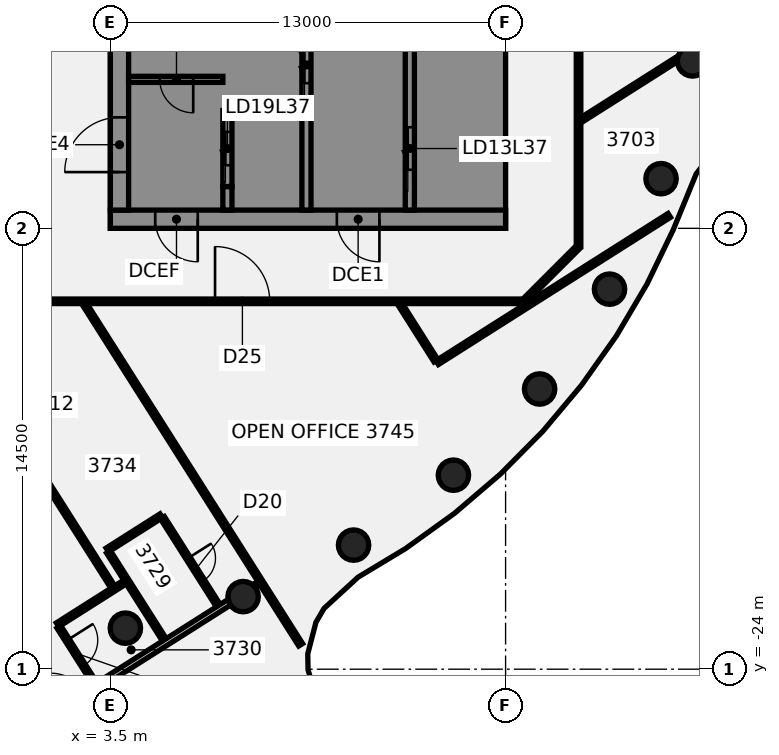
"""IFC4 building model, lengths in metres.
Left out: names, types, materials, properties, quantities, classifications, styles, units other than length and angle.
Written with IfcOpenShell. Run it as: python <this file> out.ifc"""

import sys

from ifc_helpers import new_model, si_unit, direction, frame, frame_2d, origin, origin_2d, place, context, subcontext, project, spatial, polyline, rectangle, circle, outline, extrude, element, fill, save


model = new_model("IFC4")
c1 = context("Model", 3, precision=1e-05, world=origin(), true_north=direction((0.0, 1.0)))
c2 = subcontext(c1, "Body", "Model", "MODEL_VIEW")
j1 = project(units=[si_unit("LENGTHUNIT", "METRE"), si_unit("PLANEANGLEUNIT", "RADIAN")], contexts=[c1])
p1 = place(None, origin())
s1 = spatial("IfcSite", under=j1, at=p1, CompositionType="ELEMENT")
p2 = place(p1, origin())
s2 = spatial("IfcBuilding", under=s1, at=p2, CompositionType="ELEMENT")
p3 = place(p2, frame((0.0, 0.0, 151.75)))
s3 = spatial("IfcBuildingStorey", under=s2, at=p3, CompositionType="ELEMENT", Elevation=151.75)
for number, where, z_axis, x_axis in (
    (1, (3.994, -22.651, -0.14), (0.0, 0.0, 1.0), (1.0, 0.0, 0.0)),
    (2, (7.866, -21.613, -0.14), (0.0, 0.0, 1.0), (1.0, 0.0, 0.0)),
    (3, (11.5, -19.919, -0.14), (0.0, 0.0, 1.0), (1.0, 0.0, 0.0)),
    (4, (14.784, -17.619, -0.14), (0.0, 0.0, 1.0), (1.0, 0.0, 0.0)),
    (5, (17.619, -14.784, -0.14), (0.0, 0.0, 1.0), (1.0, 0.0, 0.0)),
    (6, (19.919, -11.5, -0.14), (0.0, 0.0, 1.0), (1.0, 0.0, 0.0)),
    (7, (21.613, -7.866, -0.14), (0.0, 0.0, 1.0), (1.0, 0.0, 0.0)),
    (8, (22.651, -3.994, -0.14), (0.0, 0.0, 1.0), (1.0, 0.0, 0.0)),
):
    element("IfcColumn", number, at=place(p3, frame(where, z_axis=z_axis, x_axis=x_axis)), inside=s3, PredefinedType="COLUMN", context=c2, shape_type="SweptSolid", body=[
        extrude(circle(Radius=0.5, at=origin_2d()), origin(), (0.0, 0.0, 1.0), 3.75),
    ])
p4 = place(p3, frame((-2.319, -11.997, 0.0), z_axis=(0.0, 0.0, 1.0), x_axis=(0.535683974437, -0.844418545232, 0.0)))
e9 = element("IfcWall", 9, at=p4, inside=s3, PredefinedType="PARTITIONING", context=c2, shape_type="SweptSolid", body=[
    extrude(rectangle(XDim=11.009, YDim=0.15, at=frame_2d((5.505, 0.0))), origin(), (0.0, 0.0, 1.0), 3.01),
])
p5 = place(p4, frame((3.485, 0.0, 0.0)))
e10 = element("IfcOpeningElement", 10, at=p5, cuts=e9, PredefinedType="OPENING", context=c2, shape_type="SweptSolid", body=[
    extrude(rectangle(XDim=0.9, YDim=2.1, at=frame_2d((0.45, 1.05))), frame((0.0, 0.085, 0.0), z_axis=(0.0, -1.0, 0.0), x_axis=(1.0, 0.0, 0.0)), (0.0, 0.0, 1.0), 0.17),
])
p6 = place(p3, frame((1.806, -22.607, 0.0), z_axis=(0.0, 0.0, 1.0), x_axis=(0.535719099476, -0.844396261513, 0.0)))
e11 = element("IfcWall", 11, at=p6, inside=s3, PredefinedType="PARTITIONING", context=c2, shape_type="SweptSolid", body=[
    extrude(rectangle(XDim=20.24, YDim=0.15, at=frame_2d((10.12, 0.0))), origin(), (0.0, 0.0, 1.0), 3.01),
])
p7 = place(p6, frame((0.52, 0.0, 0.0)))
e12 = element("IfcOpeningElement", 12, at=p7, cuts=e11, PredefinedType="OPENING", context=c2, shape_type="SweptSolid", body=[
    extrude(rectangle(XDim=1.0, YDim=2.1, at=frame_2d((0.5, 1.05))), frame((0.0, 0.085, 0.0), z_axis=(0.0, -1.0, 0.0), x_axis=(1.0, 0.0, 0.0)), (0.0, 0.0, 1.0), 0.17),
])
p8 = place(p6, frame((10.571, 0.0, 0.0)))
e13 = element("IfcOpeningElement", 13, at=p8, cuts=e11, PredefinedType="OPENING", context=c2, shape_type="SweptSolid", body=[
    extrude(rectangle(XDim=0.9, YDim=2.1, at=frame_2d((0.45, 1.05))), frame((0.0, 0.085, 0.0), z_axis=(0.0, -1.0, 0.0), x_axis=(1.0, 0.0, 0.0)), (0.0, 0.0, 1.0), 0.17),
])
p9 = place(p6, frame((17.021, 0.0, 0.0)))
e14 = element("IfcOpeningElement", 14, at=p9, cuts=e11, PredefinedType="OPENING", context=c2, shape_type="SweptSolid", body=[
    extrude(rectangle(XDim=0.9, YDim=2.1, at=frame_2d((0.45, 1.05))), frame((0.0, 0.085, 0.0), z_axis=(0.0, -1.0, 0.0), x_axis=(1.0, 0.0, 0.0)), (0.0, 0.0, 1.0), 0.17),
])
p10 = place(p3, frame((2.655, -11.997, 0.0), z_axis=(0.0, 0.0, 1.0), x_axis=(0.53566721482, -0.844429176999, 0.0)))
e15 = element("IfcWall", 15, at=p10, inside=s3, PredefinedType="PARTITIONING", context=c2, shape_type="SweptSolid", body=[
    extrude(rectangle(XDim=13.263, YDim=0.15, at=frame_2d((6.632, 0.0))), origin(), (0.0, 0.0, 1.0), 3.01),
])
p11 = place(p3, frame((3.44, -20.143, 0.0), z_axis=(0.0, 0.0, 1.0), x_axis=(0.535892834872, -0.844286011689, 0.0)))
e16 = element("IfcWall", 16, at=p11, inside=s3, PredefinedType="PARTITIONING", context=c2, shape_type="SweptSolid", body=[
    extrude(rectangle(XDim=3.426, YDim=0.15, at=frame_2d((1.713, 0.0))), origin(), (0.0, 0.0, 1.0), 3.01),
])
p12 = place(p3, frame((5.214, -19.018, 0.0), z_axis=(0.0, 0.0, 1.0), x_axis=(0.535555665094, -0.844499928707, 0.0)))
e17 = element("IfcWall", 17, at=p12, inside=s3, PredefinedType="PARTITIONING", context=c2, shape_type="SweptSolid", body=[
    extrude(rectangle(XDim=3.425, YDim=0.15, at=frame_2d((1.712, 0.0))), origin(), (0.0, 0.0, 1.0), 3.01),
])
p13 = place(p12, frame((1.575, 0.0, 0.0)))
e18 = element("IfcOpeningElement", 18, at=p13, cuts=e17, PredefinedType="OPENING", context=c2, shape_type="SweptSolid", body=[
    extrude(rectangle(XDim=0.9, YDim=2.1, at=frame_2d((0.45, 1.05))), frame((0.0, 0.085, 0.0), z_axis=(0.0, -1.0, 0.0), x_axis=(1.0, 0.0, 0.0)), (0.0, 0.0, 1.0), 0.17),
])
p14 = place(p3, frame((13.031, -11.997, 0.0), z_axis=(0.0, 0.0, 1.0), x_axis=(0.535487935778, -0.84454287673, 0.0)))
e19 = element("IfcWall", 19, at=p14, inside=s3, PredefinedType="PARTITIONING", context=c2, shape_type="SweptSolid", body=[
    extrude(rectangle(XDim=2.198, YDim=0.15, at=frame_2d((1.099, 0.0))), origin(), (0.0, 0.0, 1.0), 3.01),
])
p15 = place(p3, frame((-17.1, -11.9, 0.0), z_axis=(0.0, 0.0, 1.0), x_axis=(1.0, 0.0, 0.0)))
e20 = element("IfcWall", 20, at=p15, inside=s3, PredefinedType="PARTITIONING", context=c2, shape_type="SweptSolid", body=[
    extrude(rectangle(XDim=34.165, YDim=0.15, at=frame_2d((17.083, 0.0))), origin(), (0.0, 0.0, 1.0), 3.01),
])
p16 = place(p15, frame((9.886, 0.0, 0.0)))
e21 = element("IfcOpeningElement", 21, at=p16, cuts=e20, PredefinedType="OPENING", context=c2, shape_type="SweptSolid", body=[
    extrude(rectangle(XDim=1.8, YDim=2.1, at=frame_2d((0.9, 1.05))), frame((0.0, 0.085, 0.0), z_axis=(0.0, -1.0, 0.0), x_axis=(1.0, 0.0, 0.0)), (0.0, 0.0, 1.0), 0.17),
])
p17 = place(p15, frame((1.95, 0.0, 0.0)))
e22 = element("IfcOpeningElement", 22, at=p17, cuts=e20, PredefinedType="OPENING", context=c2, shape_type="SweptSolid", body=[
    extrude(rectangle(XDim=1.8, YDim=2.1, at=frame_2d((0.9, 1.05))), frame((0.0, 0.085, 0.0), z_axis=(0.0, -1.0, 0.0), x_axis=(1.0, 0.0, 0.0)), (0.0, 0.0, 1.0), 0.17),
])
p18 = place(p15, frame((24.043, 0.0, 0.0)))
e23 = element("IfcOpeningElement", 23, at=p18, cuts=e20, PredefinedType="OPENING", context=c2, shape_type="SweptSolid", body=[
    extrude(rectangle(XDim=1.8, YDim=2.1, at=frame_2d((0.9, 1.05))), frame((0.0, 0.085, 0.0), z_axis=(0.0, -1.0, 0.0), x_axis=(1.0, 0.0, 0.0)), (0.0, 0.0, 1.0), 0.17),
])
p19 = place(p3, frame((3.4, -20.08, 0.0), z_axis=(0.0, 0.0, 1.0), x_axis=(0.844388056722, 0.535732031584, 0.0)))
e24 = element("IfcWall", 24, at=p19, inside=s3, PredefinedType="PARTITIONING", context=c2, shape_type="SweptSolid", body=[
    extrude(rectangle(XDim=2.101, YDim=0.15, at=frame_2d((1.05, 0.0))), origin(), (0.0, 0.0, 1.0), 3.01),
])
p20 = place(p3, frame((-3.621, -28.798, 0.0), z_axis=(0.0, 0.0, 1.0), x_axis=(0.844419013284, 0.535683236627, 0.0)))
e25 = element("IfcWall", 25, at=p20, inside=s3, PredefinedType="PARTITIONING", context=c2, shape_type="SweptSolid", body=[
    extrude(rectangle(XDim=13.322, YDim=0.2, at=frame_2d((6.661, 0.0))), origin(), (0.0, 0.0, 1.0), 3.01),
])
p21 = place(p20, frame((6.099, 0.0, 0.0)))
e26 = element("IfcOpeningElement", 26, at=p21, cuts=e25, PredefinedType="OPENING", context=c2, shape_type="SweptSolid", body=[
    extrude(rectangle(XDim=1.4, YDim=2.1, at=frame_2d((0.7, 1.05))), frame((0.0, 0.11, 0.0), z_axis=(0.0, -1.0, 0.0), x_axis=(1.0, 0.0, 0.0)), (0.0, 0.0, 1.0), 0.22),
])
p22 = place(p3, frame((8.008, -21.42, 0.0), z_axis=(0.0, 0.0, 1.0), x_axis=(0.844395258973, 0.535720679668, 0.0)))
e27 = element("IfcWall", 27, at=p22, inside=s3, PredefinedType="PARTITIONING", context=c2, shape_type="SweptSolid", body=[
    extrude(rectangle(XDim=0.452, YDim=0.15, at=frame_2d((0.226, 0.0))), origin(), (0.0, 0.0, 1.0), 3.01),
])
p23 = place(p3, frame((1.763, -22.54, 0.0), z_axis=(0.0, 0.0, 1.0), x_axis=(0.844519885182, 0.535524195095, 0.0)))
e28 = element("IfcWall", 28, at=p23, inside=s3, PredefinedType="PARTITIONING", context=c2, shape_type="SweptSolid", body=[
    extrude(rectangle(XDim=2.62, YDim=0.15, at=frame_2d((1.31, 0.0))), origin(), (0.0, 0.0, 1.0), 3.01),
])
p24 = place(p3, frame((14.249, -13.917, 0.0), z_axis=(0.0, 0.0, 1.0), x_axis=(0.844422195246, 0.535678220741, 0.0)))
e29 = element("IfcWall", 29, at=p24, inside=s3, PredefinedType="PARTITIONING", context=c2, shape_type="SweptSolid", body=[
    extrude(rectangle(XDim=9.042, YDim=0.15, at=frame_2d((4.521, 0.0))), origin(), (0.0, 0.0, 1.0), 3.01),
])
p25 = place(p3, frame((18.997, -5.931, 0.0), z_axis=(0.0, 0.0, 1.0), x_axis=(0.844425849741, 0.535672459894, 0.0)))
e30 = element("IfcWall", 30, at=p25, inside=s3, PredefinedType="PARTITIONING", context=c2, shape_type="SweptSolid", body=[
    extrude(rectangle(XDim=3.744, YDim=0.15, at=frame_2d((1.872, 0.0))), origin(), (0.0, 0.0, 1.0), 3.01),
])
p26 = place(p3, frame((17.1, -11.9, 0.0), z_axis=(0.0, 0.0, 1.0), x_axis=(0.707106781187, 0.707106781187, 0.0)))
e31 = element("IfcWall", 31, at=p26, inside=s3, PredefinedType="PARTITIONING", context=c2, shape_type="SweptSolid", body=[
    extrude(rectangle(XDim=2.505, YDim=0.15, at=frame_2d((1.253, 0.0))), origin(), (0.0, 0.0, 1.0), 3.01),
])
p27 = place(p3, frame((18.9, -10.1, 0.0), z_axis=(0.0, 0.0, 1.0), x_axis=(0.0, 1.0, 0.0)))
e32 = element("IfcWall", 32, at=p27, inside=s3, PredefinedType="PARTITIONING", context=c2, shape_type="SweptSolid", body=[
    extrude(rectangle(XDim=20.2, YDim=0.15, at=frame_2d((10.1, 0.0))), origin(), (0.0, 0.0, 1.0), 3.01),
])
p28 = place(p27, frame((8.157, 0.0, 0.0)))
e33 = element("IfcOpeningElement", 33, at=p28, cuts=e32, PredefinedType="OPENING", context=c2, shape_type="SweptSolid", body=[
    extrude(rectangle(XDim=1.8, YDim=2.1, at=frame_2d((0.9, 1.05))), frame((0.0, 0.085, 0.0), z_axis=(0.0, -1.0, 0.0), x_axis=(1.0, 0.0, 0.0)), (0.0, 0.0, 1.0), 0.17),
])
p29 = place(p27, frame((13.66, 0.0, 0.0)))
e34 = element("IfcOpeningElement", 34, at=p29, cuts=e32, PredefinedType="OPENING", context=c2, shape_type="SweptSolid", body=[
    extrude(rectangle(XDim=0.9, YDim=2.1, at=frame_2d((0.45, 1.05))), frame((0.0, 0.085, 0.0), z_axis=(0.0, -1.0, 0.0), x_axis=(1.0, 0.0, 0.0)), (0.0, 0.0, 1.0), 0.17),
])
p30 = place(p3, frame((16.5, -9.2, 0.0), z_axis=(0.0, 0.0, 1.0), x_axis=(-1.0, 0.0, 0.0)))
e35 = element("IfcWall", 35, at=p30, inside=s3, PredefinedType="SHEAR", context=c2, shape_type="SweptSolid", body=[
    extrude(rectangle(XDim=13.0, YDim=0.6, at=frame_2d((6.5, 0.0))), origin(), (0.0, 0.0, 1.0), 3.61),
])
p31 = place(p30, frame((4.15, 0.0, 0.0)))
e36 = element("IfcOpeningElement", 36, at=p31, cuts=e35, PredefinedType="OPENING", context=c2, shape_type="SweptSolid", body=[
    extrude(rectangle(XDim=1.4, YDim=2.1, at=frame_2d((0.7, 1.05))), frame((0.0, 0.31, 0.0), z_axis=(0.0, -1.0, 0.0), x_axis=(1.0, 0.0, 0.0)), (0.0, 0.0, 1.0), 0.62),
])
p32 = place(p30, frame((10.125, 0.0, 0.0)))
e37 = element("IfcOpeningElement", 37, at=p32, cuts=e35, PredefinedType="OPENING", context=c2, shape_type="SweptSolid", body=[
    extrude(rectangle(XDim=1.4, YDim=2.1, at=frame_2d((0.7, 1.05))), frame((0.0, 0.31, 0.0), z_axis=(0.0, -1.0, 0.0), x_axis=(1.0, 0.0, 0.0)), (0.0, 0.0, 1.0), 0.62),
])
p33 = place(p3, origin())
e38 = element("IfcWall", 38, at=p33, inside=s3, PredefinedType="SHEAR", context=c2, shape_type="SweptSolid", body=[
    extrude(outline(polyline([(13.5, -8.125), (13.5, -8.9), (15.9, -8.9), (16.5, -8.9), (16.5, 8.9), (15.9, 8.9), (13.5, 8.9), (13.5, 8.125), (15.9, 8.125), (15.9, 5.625), (13.5, 5.625), (13.5, 5.375), (15.9, 5.375), (15.9, -5.375), (13.5, -5.375), (13.5, -5.625), (15.9, -5.625), (15.9, -8.125), (13.5, -8.125)])), origin(), (0.0, 0.0, 1.0), 3.61),
])
p34 = place(p3, origin())
e39 = element("IfcWall", 39, at=p34, inside=s3, PredefinedType="SHEAR", context=c2, shape_type="SweptSolid", body=[
    extrude(outline(polyline([(9.8, -5.375), (7.5, -5.375), (7.5, -2.875), (9.8, -2.875), (9.8, -2.625), (7.5, -2.625), (7.5, -0.125), (9.8, -0.125), (9.8, 0.125), (7.5, 0.125), (7.5, 2.625), (9.8, 2.625), (9.8, 2.875), (7.5, 2.875), (7.5, 5.375), (9.8, 5.375), (9.8, 5.625), (7.5, 5.625), (7.5, 8.125), (9.8, 8.125), (9.8, 8.9), (7.5, 8.9), (7.2, 8.9), (7.2, -5.625), (7.5, -5.625), (9.8, -5.625), (9.8, -5.375)])), origin(), (0.0, 0.0, 1.0), 3.61),
])
p35 = place(p3, origin())
e40 = element("IfcWall", 40, at=p35, inside=s3, PredefinedType="SHEAR", context=c2, shape_type="SweptSolid", body=[
    extrude(outline(polyline([(7.5, -8.125), (7.5, -8.9), (9.8, -8.9), (9.8, -8.125), (9.8, -5.625), (9.55, -5.625), (9.55, -8.125), (7.5, -8.125)])), origin(), (0.0, 0.0, 1.0), 3.61),
])
p36 = place(p3, frame((7.35, -8.9, 0.0), z_axis=(0.0, 0.0, 1.0), x_axis=(0.0, 1.0, 0.0)))
e41 = element("IfcWall", 41, at=p36, inside=s3, PredefinedType="SHEAR", context=c2, shape_type="SweptSolid", body=[
    extrude(rectangle(XDim=0.775, YDim=0.3, at=frame_2d((0.387, 0.0))), origin(), (0.0, 0.0, 1.0), 3.61),
])
p37 = place(p3, frame((13.35, -8.9, 0.0), z_axis=(0.0, 0.0, 1.0), x_axis=(0.0, 1.0, 0.0)))
e42 = element("IfcWall", 42, at=p37, inside=s3, PredefinedType="SHEAR", context=c2, shape_type="SweptSolid", body=[
    extrude(rectangle(XDim=17.8, YDim=0.3, at=frame_2d((8.9, 0.0))), origin(), (0.0, 0.0, 1.0), 3.61),
])
p38 = place(p37, frame((1.325, 0.0, 0.0)))
e43 = element("IfcOpeningElement", 43, at=p38, cuts=e42, PredefinedType="OPENING", context=c2, shape_type="SweptSolid", body=[
    extrude(rectangle(XDim=1.4, YDim=2.1, at=frame_2d((0.7, 1.05))), frame((0.0, 0.16, 0.0), z_axis=(0.0, -1.0, 0.0), x_axis=(1.0, 0.0, 0.0)), (0.0, 0.0, 1.0), 0.32),
])
p39 = place(p37, frame((8.4, 0.0, 0.0)))
e44 = element("IfcOpeningElement", 44, at=p39, cuts=e42, PredefinedType="OPENING", context=c2, shape_type="SweptSolid", body=[
    extrude(rectangle(XDim=1.0, YDim=2.1, at=frame_2d((0.5, 1.05))), frame((0.0, 0.16, 0.0), z_axis=(0.0, -1.0, 0.0), x_axis=(1.0, 0.0, 0.0)), (0.0, 0.0, 1.0), 0.32),
])
p40 = place(p3, frame((9.95, -8.9, 0.0), z_axis=(0.0, 0.0, 1.0), x_axis=(0.0, 1.0, 0.0)))
e45 = element("IfcWall", 45, at=p40, inside=s3, PredefinedType="SHEAR", context=c2, shape_type="SweptSolid", body=[
    extrude(rectangle(XDim=17.8, YDim=0.3, at=frame_2d((8.9, 0.0))), origin(), (0.0, 0.0, 1.0), 3.61),
])
p41 = place(p40, frame((4.175, 0.0, 0.0)))
e46 = element("IfcOpeningElement", 46, at=p41, cuts=e45, PredefinedType="OPENING", context=c2, shape_type="SweptSolid", body=[
    extrude(rectangle(XDim=1.2, YDim=2.1, at=frame_2d((0.6, 1.05))), frame((0.0, 0.16, 0.0), z_axis=(0.0, -1.0, 0.0), x_axis=(1.0, 0.0, 0.0)), (0.0, 0.0, 1.0), 0.32),
])
p42 = place(p40, frame((6.925, 0.0, 0.0)))
e47 = element("IfcOpeningElement", 47, at=p42, cuts=e45, PredefinedType="OPENING", context=c2, shape_type="SweptSolid", body=[
    extrude(rectangle(XDim=1.2, YDim=2.1, at=frame_2d((0.6, 1.05))), frame((0.0, 0.16, 0.0), z_axis=(0.0, -1.0, 0.0), x_axis=(1.0, 0.0, 0.0)), (0.0, 0.0, 1.0), 0.32),
])
p43 = place(p3, frame((7.35, -8.125, 0.0), z_axis=(0.0, 0.0, 1.0), x_axis=(0.0, 1.0, 0.0)))
e48 = element("IfcWall", 48, at=p43, inside=s3, PredefinedType="SHEAR", context=c2, shape_type="SweptSolid", body=[
    extrude(rectangle(XDim=2.5, YDim=0.3, at=frame_2d((1.25, 0.0))), origin(), (0.0, 0.0, 1.0), 3.61),
])
p44 = place(p43, frame((0.7, 0.0, 0.0)))
e49 = element("IfcOpeningElement", 49, at=p44, cuts=e48, PredefinedType="OPENING", context=c2, shape_type="SweptSolid", body=[
    extrude(rectangle(XDim=1.1, YDim=2.1, at=frame_2d((0.55, 1.05))), frame((0.0, 0.16, 0.0), z_axis=(0.0, -1.0, 0.0), x_axis=(1.0, 0.0, 0.0)), (0.0, 0.0, 1.0), 0.32),
])
p45 = place(p3, frame((3.8, -8.9, 0.0), z_axis=(0.0, 0.0, 1.0), x_axis=(0.0, 1.0, 0.0)))
e50 = element("IfcWall", 50, at=p45, inside=s3, PredefinedType="SHEAR", context=c2, shape_type="SweptSolid", body=[
    extrude(rectangle(XDim=17.8, YDim=0.6, at=frame_2d((8.9, 0.0))), origin(), (0.0, 0.0, 1.0), 3.61),
])
p46 = place(p45, frame((1.25, 0.0, 0.0)))
e51 = element("IfcOpeningElement", 51, at=p46, cuts=e50, PredefinedType="OPENING", context=c2, shape_type="SweptSolid", body=[
    extrude(rectangle(XDim=1.8, YDim=2.1, at=frame_2d((0.9, 1.05))), frame((0.0, 0.31, 0.0), z_axis=(0.0, -1.0, 0.0), x_axis=(1.0, 0.0, 0.0)), (0.0, 0.0, 1.0), 0.62),
])
p47 = place(p45, frame((11.698, 0.0, 0.0)))
e52 = element("IfcOpeningElement", 52, at=p47, cuts=e50, PredefinedType="OPENING", context=c2, shape_type="SweptSolid", body=[
    extrude(rectangle(XDim=1.0, YDim=2.1, at=frame_2d((0.5, 1.05))), frame((0.0, 0.31, 0.0), z_axis=(0.0, -1.0, 0.0), x_axis=(1.0, 0.0, 0.0)), (0.0, 0.0, 1.0), 0.62),
])
p48 = place(p45, frame((15.222, 0.0, 0.0)))
e53 = element("IfcOpeningElement", 53, at=p48, cuts=e50, PredefinedType="OPENING", context=c2, shape_type="SweptSolid", body=[
    extrude(rectangle(XDim=1.0, YDim=2.1, at=frame_2d((0.5, 1.05))), frame((0.0, 0.31, 0.0), z_axis=(0.0, -1.0, 0.0), x_axis=(1.0, 0.0, 0.0)), (0.0, 0.0, 1.0), 0.62),
])
p49 = place(p3, frame((7.2, -4.6, 0.0), z_axis=(0.0, 0.0, 1.0), x_axis=(-1.0, 0.0, 0.0)))
e54 = element("IfcWall", 54, at=p49, inside=s3, PredefinedType="SHEAR", context=c2, shape_type="SweptSolid", body=[
    extrude(rectangle(XDim=3.1, YDim=0.2, at=frame_2d((1.55, 0.0))), origin(), (0.0, 0.0, 1.0), 3.61),
])
p50 = place(p49, frame((0.975, 0.0, 0.0)))
e55 = element("IfcOpeningElement", 55, at=p50, cuts=e54, PredefinedType="OPENING", context=c2, shape_type="SweptSolid", body=[
    extrude(rectangle(XDim=1.1, YDim=2.1, at=frame_2d((0.55, 1.05))), frame((0.0, 0.11, 0.0), z_axis=(0.0, -1.0, 0.0), x_axis=(1.0, 0.0, 0.0)), (0.0, 0.0, 1.0), 0.22),
])
p51 = place(p7, origin())
e56 = element("IfcDoor", 56, at=p51, inside=s3, OperationType="SINGLE_SWING_RIGHT", PredefinedType="DOOR", context=c2, shape_type="SweptSolid", body=[
    extrude(rectangle(XDim=1.0, YDim=2.1, at=frame_2d((0.5, 1.05))), frame((0.0, 0.025, 0.0), z_axis=(0.0, -1.0, 0.0), x_axis=(1.0, 0.0, 0.0)), (0.0, 0.0, 1.0), 0.05),
])
fill(e12, e56)
p52 = place(p13, frame((0.9, 0.0, 0.0), z_axis=(0.0, 0.0, 1.0), x_axis=(-1.0, 0.0, 0.0)))
e57 = element("IfcDoor", 57, at=p52, inside=s3, OperationType="SINGLE_SWING_RIGHT", PredefinedType="DOOR", context=c2, shape_type="SweptSolid", body=[
    extrude(rectangle(XDim=0.9, YDim=2.1, at=frame_2d((0.45, 1.05))), frame((0.0, 0.025, 0.0), z_axis=(0.0, -1.0, 0.0), x_axis=(1.0, 0.0, 0.0)), (0.0, 0.0, 1.0), 0.05),
])
fill(e18, e57)
p53 = place(p18, frame((1.8, 0.0, 0.0), z_axis=(0.0, 0.0, 1.0), x_axis=(-1.0, 0.0, 0.0)))
e58 = element("IfcDoor", 58, at=p53, inside=s3, OperationType="DOUBLE_DOOR_SINGLE_SWING", PredefinedType="DOOR", context=c2, shape_type="SweptSolid", body=[
    extrude(rectangle(XDim=1.8, YDim=2.1, at=frame_2d((0.9, 1.05))), frame((0.0, 0.025, 0.0), z_axis=(0.0, -1.0, 0.0), x_axis=(1.0, 0.0, 0.0)), (0.0, 0.0, 1.0), 0.05),
])
fill(e23, e58)
p54 = place(p31, origin())
e59 = element("IfcDoor", 59, at=p54, inside=s3, OperationType="SINGLE_SWING_LEFT", PredefinedType="DOOR", context=c2, shape_type="SweptSolid", body=[
    extrude(rectangle(XDim=1.4, YDim=2.1, at=frame_2d((0.7, 1.05))), frame((0.0, 0.025, 0.0), z_axis=(0.0, -1.0, 0.0), x_axis=(1.0, 0.0, 0.0)), (0.0, 0.0, 1.0), 0.05),
])
fill(e36, e59)
p55 = place(p32, origin())
e60 = element("IfcDoor", 60, at=p55, inside=s3, OperationType="SINGLE_SWING_LEFT", PredefinedType="DOOR", context=c2, shape_type="SweptSolid", body=[
    extrude(rectangle(XDim=1.4, YDim=2.1, at=frame_2d((0.7, 1.05))), frame((0.0, 0.025, 0.0), z_axis=(0.0, -1.0, 0.0), x_axis=(1.0, 0.0, 0.0)), (0.0, 0.0, 1.0), 0.05),
])
fill(e37, e60)
p56 = place(p46, origin())
e61 = element("IfcDoor", 61, at=p56, inside=s3, OperationType="SINGLE_SWING_LEFT", PredefinedType="DOOR", context=c2, shape_type="SweptSolid", body=[
    extrude(rectangle(XDim=1.8, YDim=2.1, at=frame_2d((0.9, 1.05))), frame((0.0, 0.025, 0.0), z_axis=(0.0, -1.0, 0.0), x_axis=(1.0, 0.0, 0.0)), (0.0, 0.0, 1.0), 0.05),
])
fill(e51, e61)
p57 = place(p50, origin())
e62 = element("IfcDoor", 62, at=p57, inside=s3, OperationType="SINGLE_SWING_LEFT", PredefinedType="DOOR", context=c2, shape_type="SweptSolid", body=[
    extrude(rectangle(XDim=1.1, YDim=2.1, at=frame_2d((0.55, 1.05))), frame((0.0, 0.025, 0.0), z_axis=(0.0, -1.0, 0.0), x_axis=(1.0, 0.0, 0.0)), (0.0, 0.0, 1.0), 0.05),
])
fill(e55, e62)
p58 = place(p38, origin())
e63 = element("IfcDoor", 63, at=p58, inside=s3, OperationType="SLIDING_TO_LEFT", PredefinedType="DOOR", context=c2, shape_type="SweptSolid", body=[
    extrude(rectangle(XDim=1.4, YDim=2.1, at=frame_2d((0.7, 1.05))), frame((0.0, 0.025, 0.0), z_axis=(0.0, -1.0, 0.0), x_axis=(1.0, 0.0, 0.0)), (0.0, 0.0, 1.0), 0.05),
])
fill(e43, e63)
p59 = place(p44, origin())
e64 = element("IfcDoor", 64, at=p59, inside=s3, OperationType="SLIDING_TO_LEFT", PredefinedType="DOOR", context=c2, shape_type="SweptSolid", body=[
    extrude(rectangle(XDim=1.1, YDim=2.1, at=frame_2d((0.55, 1.05))), frame((0.0, 0.025, 0.0), z_axis=(0.0, -1.0, 0.0), x_axis=(1.0, 0.0, 0.0)), (0.0, 0.0, 1.0), 0.05),
])
fill(e49, e64)
p60 = place(p41, origin())
e65 = element("IfcDoor", 65, at=p60, inside=s3, OperationType="SLIDING_TO_LEFT", PredefinedType="DOOR", context=c2, shape_type="SweptSolid", body=[
    extrude(rectangle(XDim=1.2, YDim=2.1, at=frame_2d((0.6, 1.05))), frame((0.0, 0.025, 0.0), z_axis=(0.0, -1.0, 0.0), x_axis=(1.0, 0.0, 0.0)), (0.0, 0.0, 1.0), 0.05),
])
fill(e46, e65)
save(model, sys.argv[1])
